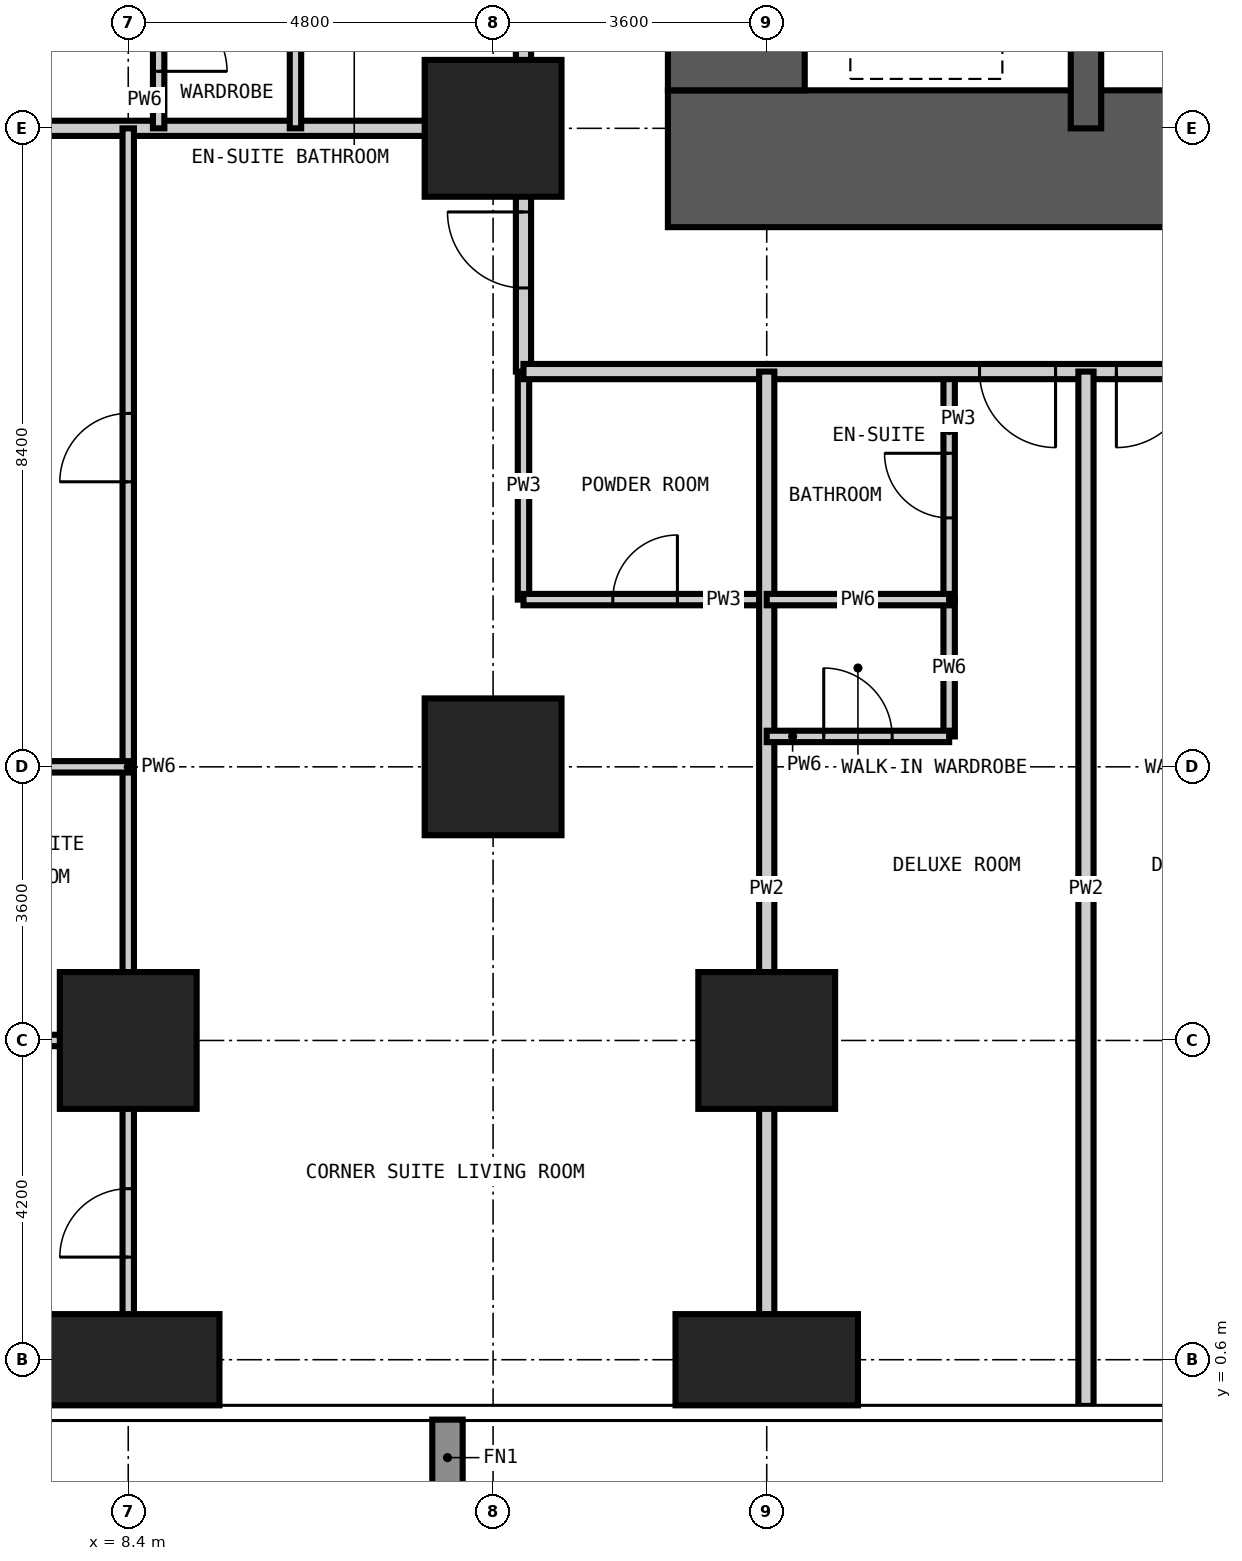
"""IFC4 building model, lengths in metres.
Left out: names, types, materials, properties, quantities, classifications, styles, units other than length and angle.
Written with IfcOpenShell. Run it as: python <this file> out.ifc"""

import sys

from ifc_helpers import new_model, si_unit, direction, frame, frame_2d, origin, origin_2d, place, context, subcontext, project, spatial, rectangle, extrude, element, fill, save


model = new_model("IFC4")
c1 = context("Model", 3, precision=1e-05, world=origin(), true_north=direction((0.0, 1.0)))
c2 = subcontext(c1, "Body", "Model", "MODEL_VIEW")
j1 = project(units=[si_unit("LENGTHUNIT", "METRE"), si_unit("PLANEANGLEUNIT", "RADIAN")], contexts=[c1])
p1 = place(None, origin())
s1 = spatial("IfcSite", under=j1, at=p1, CompositionType="ELEMENT")
p2 = place(p1, origin())
s2 = spatial("IfcBuilding", under=s1, at=p2, CompositionType="ELEMENT")
p3 = place(p2, frame((0.0, 0.0, 30.6)))
s3 = spatial("IfcBuildingStorey", under=s2, at=p3, CompositionType="ELEMENT", Elevation=30.6)
p4 = place(p3, frame((8.4, 0.6, -0.35), z_axis=(0.0, 0.0, 1.0), x_axis=(1.0, 0.0, 0.0)))
e1 = element("IfcColumn", 1, at=p4, inside=s3, PredefinedType="COLUMN", context=c2, shape_type="SweptSolid", body=[
    extrude(rectangle(XDim=2.4, YDim=1.2, at=origin_2d()), origin(), (0.0, 0.0, 1.0), 3.6),
])
for number, where, z_axis, x_axis in (
    (2, (8.4, 4.8, -0.35), (0.0, 0.0, 1.0), (1.0, 0.0, 0.0)),
    (3, (13.2, 8.4, -0.35), (0.0, 0.0, 1.0), (1.0, 0.0, 0.0)),
    (4, (13.2, 16.8, -0.35), (0.0, 0.0, 1.0), (1.0, 0.0, 0.0)),
):
    element("IfcColumn", number, at=place(p3, frame(where, z_axis=z_axis, x_axis=x_axis)), inside=s3, PredefinedType="COLUMN", context=c2, shape_type="SweptSolid", body=[
        extrude(rectangle(XDim=1.8, YDim=1.8, at=origin_2d()), origin(), (0.0, 0.0, 1.0), 3.6),
    ])
p5 = place(p3, frame((16.8, 0.6, -0.35), z_axis=(0.0, 0.0, 1.0), x_axis=(1.0, 0.0, 0.0)))
e5 = element("IfcColumn", 5, at=p5, inside=s3, PredefinedType="COLUMN", context=c2, shape_type="SweptSolid", body=[
    extrude(rectangle(XDim=2.4, YDim=1.2, at=origin_2d()), origin(), (0.0, 0.0, 1.0), 3.6),
])
p6 = place(p3, frame((16.8, 4.8, -0.35), z_axis=(0.0, 0.0, 1.0), x_axis=(1.0, 0.0, 0.0)))
e6 = element("IfcColumn", 6, at=p6, inside=s3, PredefinedType="COLUMN", context=c2, shape_type="SweptSolid", body=[
    extrude(rectangle(XDim=1.8, YDim=1.8, at=origin_2d()), origin(), (0.0, 0.0, 1.0), 3.6),
])
p7 = place(p3, frame((15.5, 16.4, -0.35), z_axis=(0.0, 0.0, 1.0), x_axis=(1.0, 0.0, 0.0)))
e7 = element("IfcWall", 7, at=p7, inside=s3, PredefinedType="SHEAR", context=c2, shape_type="SweptSolid", body=[
    extrude(rectangle(XDim=27.8, YDim=1.8, at=frame_2d((13.9, 0.0))), origin(), (0.0, 0.0, 1.0), 3.6),
])
p8 = place(p7, frame((13.4, 0.0, 0.35)))
e8 = element("IfcOpeningElement", 8, at=p8, cuts=e7, PredefinedType="OPENING", context=c2, shape_type="SweptSolid", body=[
    extrude(rectangle(XDim=1.0, YDim=2.1, at=frame_2d((0.5, 1.05))), frame((0.0, 0.91, 0.0), z_axis=(0.0, -1.0, 0.0), x_axis=(1.0, 0.0, 0.0)), (0.0, 0.0, 1.0), 1.82),
])
p9 = place(p7, frame((19.7, 0.0, 0.35)))
e9 = element("IfcOpeningElement", 9, at=p9, cuts=e7, PredefinedType="OPENING", context=c2, shape_type="SweptSolid", body=[
    extrude(rectangle(XDim=1.0, YDim=2.1, at=frame_2d((0.5, 1.05))), frame((0.0, 0.91, 0.0), z_axis=(0.0, -1.0, 0.0), x_axis=(1.0, 0.0, 0.0)), (0.0, 0.0, 1.0), 1.82),
])
p10 = place(p3, frame((16.4, 41.5, -0.35), z_axis=(0.0, 0.0, 1.0), x_axis=(0.0, -1.0, 0.0)))
e10 = element("IfcWall", 10, at=p10, inside=s3, PredefinedType="SHEAR", context=c2, shape_type="SweptSolid", body=[
    extrude(rectangle(XDim=24.2, YDim=1.8, at=frame_2d((12.1, 0.0))), origin(), (0.0, 0.0, 1.0), 3.6),
])
p11 = place(p10, frame((11.2, 0.0, 0.35)))
e11 = element("IfcOpeningElement", 11, at=p11, cuts=e10, PredefinedType="OPENING", context=c2, shape_type="SweptSolid", body=[
    extrude(rectangle(XDim=1.8, YDim=2.2, at=frame_2d((0.9, 1.1))), frame((0.0, 0.91, 0.0), z_axis=(0.0, -1.0, 0.0), x_axis=(1.0, 0.0, 0.0)), (0.0, 0.0, 1.0), 1.82),
])
p12 = place(p10, frame((20.0, 0.0, 0.35)))
e12 = element("IfcOpeningElement", 12, at=p12, cuts=e10, PredefinedType="OPENING", context=c2, shape_type="SweptSolid", body=[
    extrude(rectangle(XDim=1.0, YDim=2.1, at=frame_2d((0.5, 1.05))), frame((0.0, 0.91, 0.0), z_axis=(0.0, -1.0, 0.0), x_axis=(1.0, 0.0, 0.0)), (0.0, 0.0, 1.0), 1.82),
])
p13 = place(p10, frame((5.3, 0.0, 0.35)))
e13 = element("IfcOpeningElement", 13, at=p13, cuts=e10, PredefinedType="OPENING", context=c2, shape_type="SweptSolid", body=[
    extrude(rectangle(XDim=1.0, YDim=2.1, at=frame_2d((0.5, 1.05))), frame((0.0, 0.91, 0.0), z_axis=(0.0, -1.0, 0.0), x_axis=(1.0, 0.0, 0.0)), (0.0, 0.0, 1.0), 1.82),
])
p14 = place(p3, frame((21.0, 16.8, -0.35), z_axis=(0.0, 0.0, 1.0), x_axis=(0.0, 1.0, 0.0)))
e14 = element("IfcWall", 14, at=p14, inside=s3, PredefinedType="SHEAR", context=c2, shape_type="SweptSolid", body=[
    extrude(rectangle(XDim=2.8, YDim=0.4, at=frame_2d((1.4, 0.0))), origin(), (0.0, 0.0, 1.0), 3.6),
])
p15 = place(p3, frame((13.6, 10.6, 0.0), z_axis=(0.0, 0.0, 1.0), x_axis=(0.0, 1.0, 0.0)))
e15 = element("IfcWall", 15, at=p15, inside=s3, PredefinedType="PARTITIONING", context=c2, shape_type="SweptSolid", body=[
    extrude(rectangle(XDim=3.0, YDim=0.15, at=frame_2d((1.5, 0.0))), origin(), (0.0, 0.0, 1.0), 3.25),
])
p16 = place(p3, frame((19.2, 10.6, 0.0), z_axis=(0.0, 0.0, 1.0), x_axis=(0.0, 1.0, 0.0)))
e16 = element("IfcWall", 16, at=p16, inside=s3, PredefinedType="PARTITIONING", context=c2, shape_type="SweptSolid", body=[
    extrude(rectangle(XDim=3.0, YDim=0.15, at=frame_2d((1.5, 0.0))), origin(), (0.0, 0.0, 1.0), 3.25),
])
p17 = place(p16, frame((1.075, 0.0, 0.0)))
e17 = element("IfcOpeningElement", 17, at=p17, cuts=e16, PredefinedType="OPENING", context=c2, shape_type="SweptSolid", body=[
    extrude(rectangle(XDim=0.85, YDim=2.1, at=frame_2d((0.425, 1.05))), frame((0.0, 0.085, 0.0), z_axis=(0.0, -1.0, 0.0), x_axis=(1.0, 0.0, 0.0)), (0.0, 0.0, 1.0), 0.17),
])
p18 = place(p3, frame((5.4, 4.8, 0.0), z_axis=(0.0, 0.0, 1.0), x_axis=(1.0, 0.0, 0.0)))
e18 = element("IfcWall", 18, at=p18, inside=s3, PredefinedType="PARTITIONING", context=c2, shape_type="SweptSolid", body=[
    extrude(rectangle(XDim=3.0, YDim=0.15, at=frame_2d((1.5, 0.0))), origin(), (0.0, 0.0, 1.0), 3.25),
])
p19 = place(p3, frame((13.6, 10.6, 0.0), z_axis=(0.0, 0.0, 1.0), x_axis=(1.0, 0.0, 0.0)))
e19 = element("IfcWall", 19, at=p19, inside=s3, PredefinedType="PARTITIONING", context=c2, shape_type="SweptSolid", body=[
    extrude(rectangle(XDim=3.2, YDim=0.15, at=frame_2d((1.6, 0.0))), origin(), (0.0, 0.0, 1.0), 3.25),
])
p20 = place(p19, frame((1.175, 0.0, 0.0)))
e20 = element("IfcOpeningElement", 20, at=p20, cuts=e19, PredefinedType="OPENING", context=c2, shape_type="SweptSolid", body=[
    extrude(rectangle(XDim=0.85, YDim=2.1, at=frame_2d((0.425, 1.05))), frame((0.0, 0.085, 0.0), z_axis=(0.0, -1.0, 0.0), x_axis=(1.0, 0.0, 0.0)), (0.0, 0.0, 1.0), 0.17),
])
p21 = place(p3, frame((13.6, 13.6, 0.0), z_axis=(0.0, 0.0, 1.0), x_axis=(0.0, 1.0, 0.0)))
e21 = element("IfcWall", 21, at=p21, inside=s3, PredefinedType="PARTITIONING", context=c2, shape_type="SweptSolid", body=[
    extrude(rectangle(XDim=20.0, YDim=0.2, at=frame_2d((10.0, 0.0))), origin(), (0.0, 0.0, 1.0), 3.25),
])
p22 = place(p21, frame((6.0, 0.0, 0.0)))
e22 = element("IfcOpeningElement", 22, at=p22, cuts=e21, PredefinedType="OPENING", context=c2, shape_type="SweptSolid", body=[
    extrude(rectangle(XDim=1.0, YDim=2.2, at=frame_2d((0.5, 1.1))), frame((0.0, 0.11, 0.0), z_axis=(0.0, -1.0, 0.0), x_axis=(1.0, 0.0, 0.0)), (0.0, 0.0, 1.0), 0.22),
])
p23 = place(p21, frame((7.8, 0.0, 0.0)))
e23 = element("IfcOpeningElement", 23, at=p23, cuts=e21, PredefinedType="OPENING", context=c2, shape_type="SweptSolid", body=[
    extrude(rectangle(XDim=1.0, YDim=2.2, at=frame_2d((0.5, 1.1))), frame((0.0, 0.11, 0.0), z_axis=(0.0, -1.0, 0.0), x_axis=(1.0, 0.0, 0.0)), (0.0, 0.0, 1.0), 0.22),
])
p24 = place(p21, frame((14.4, 0.0, 0.0)))
e24 = element("IfcOpeningElement", 24, at=p24, cuts=e21, PredefinedType="OPENING", context=c2, shape_type="SweptSolid", body=[
    extrude(rectangle(XDim=1.0, YDim=2.2, at=frame_2d((0.5, 1.1))), frame((0.0, 0.11, 0.0), z_axis=(0.0, -1.0, 0.0), x_axis=(1.0, 0.0, 0.0)), (0.0, 0.0, 1.0), 0.22),
])
p25 = place(p21, frame((16.2, 0.0, 0.0)))
e25 = element("IfcOpeningElement", 25, at=p25, cuts=e21, PredefinedType="OPENING", context=c2, shape_type="SweptSolid", body=[
    extrude(rectangle(XDim=1.0, YDim=2.2, at=frame_2d((0.5, 1.1))), frame((0.0, 0.11, 0.0), z_axis=(0.0, -1.0, 0.0), x_axis=(1.0, 0.0, 0.0)), (0.0, 0.0, 1.0), 0.22),
])
p26 = place(p21, frame((1.1, 0.0, 0.0)))
e26 = element("IfcOpeningElement", 26, at=p26, cuts=e21, PredefinedType="OPENING", context=c2, shape_type="SweptSolid", body=[
    extrude(rectangle(XDim=1.0, YDim=2.2, at=frame_2d((0.5, 1.1))), frame((0.0, 0.11, 0.0), z_axis=(0.0, -1.0, 0.0), x_axis=(1.0, 0.0, 0.0)), (0.0, 0.0, 1.0), 0.22),
])
p27 = place(p3, frame((45.5, 13.6, 0.0), z_axis=(0.0, 0.0, 1.0), x_axis=(-1.0, 0.0, 0.0)))
e27 = element("IfcWall", 27, at=p27, inside=s3, PredefinedType="PARTITIONING", context=c2, shape_type="SweptSolid", body=[
    extrude(rectangle(XDim=31.9, YDim=0.2, at=frame_2d((15.95, 0.0))), origin(), (0.0, 0.0, 1.0), 3.25),
])
p28 = place(p27, frame((24.9, 0.0, 0.0)))
e28 = element("IfcOpeningElement", 28, at=p28, cuts=e27, PredefinedType="OPENING", context=c2, shape_type="SweptSolid", body=[
    extrude(rectangle(XDim=1.0, YDim=2.2, at=frame_2d((0.5, 1.1))), frame((0.0, 0.11, 0.0), z_axis=(0.0, -1.0, 0.0), x_axis=(1.0, 0.0, 0.0)), (0.0, 0.0, 1.0), 0.22),
])
p29 = place(p27, frame((23.1, 0.0, 0.0)))
e29 = element("IfcOpeningElement", 29, at=p29, cuts=e27, PredefinedType="OPENING", context=c2, shape_type="SweptSolid", body=[
    extrude(rectangle(XDim=1.0, YDim=2.2, at=frame_2d((0.5, 1.1))), frame((0.0, 0.11, 0.0), z_axis=(0.0, -1.0, 0.0), x_axis=(1.0, 0.0, 0.0)), (0.0, 0.0, 1.0), 0.22),
])
p30 = place(p27, frame((16.5, 0.0, 0.0)))
e30 = element("IfcOpeningElement", 30, at=p30, cuts=e27, PredefinedType="OPENING", context=c2, shape_type="SweptSolid", body=[
    extrude(rectangle(XDim=1.0, YDim=2.2, at=frame_2d((0.5, 1.1))), frame((0.0, 0.11, 0.0), z_axis=(0.0, -1.0, 0.0), x_axis=(1.0, 0.0, 0.0)), (0.0, 0.0, 1.0), 0.22),
])
p31 = place(p27, frame((14.7, 0.0, 0.0)))
e31 = element("IfcOpeningElement", 31, at=p31, cuts=e27, PredefinedType="OPENING", context=c2, shape_type="SweptSolid", body=[
    extrude(rectangle(XDim=1.0, YDim=2.2, at=frame_2d((0.5, 1.1))), frame((0.0, 0.11, 0.0), z_axis=(0.0, -1.0, 0.0), x_axis=(1.0, 0.0, 0.0)), (0.0, 0.0, 1.0), 0.22),
])
p32 = place(p27, frame((8.1, 0.0, 0.0)))
e32 = element("IfcOpeningElement", 32, at=p32, cuts=e27, PredefinedType="OPENING", context=c2, shape_type="SweptSolid", body=[
    extrude(rectangle(XDim=1.0, YDim=2.2, at=frame_2d((0.5, 1.1))), frame((0.0, 0.11, 0.0), z_axis=(0.0, -1.0, 0.0), x_axis=(1.0, 0.0, 0.0)), (0.0, 0.0, 1.0), 0.22),
])
p33 = place(p27, frame((6.3, 0.0, 0.0)))
e33 = element("IfcOpeningElement", 33, at=p33, cuts=e27, PredefinedType="OPENING", context=c2, shape_type="SweptSolid", body=[
    extrude(rectangle(XDim=1.0, YDim=2.2, at=frame_2d((0.5, 1.1))), frame((0.0, 0.11, 0.0), z_axis=(0.0, -1.0, 0.0), x_axis=(1.0, 0.0, 0.0)), (0.0, 0.0, 1.0), 0.22),
])
for number, where, z_axis, x_axis in (
    (34, (16.8, -0.008, 0.0), (0.0, 0.0, 1.0), (0.0, 1.0, 0.0)),
    (35, (21.0, -0.008, 0.0), (0.0, 0.0, 1.0), (0.0, 1.0, 0.0)),
    (36, (-0.008, 16.8, 0.0), (0.0, 0.0, 1.0), (1.0, 0.0, 0.0)),
):
    element("IfcWall", number, at=place(p3, frame(where, z_axis=z_axis, x_axis=x_axis)), inside=s3, PredefinedType="PARTITIONING", context=c2, shape_type="SweptSolid", body=[
        extrude(rectangle(XDim=13.608, YDim=0.2, at=frame_2d((6.804, 0.0))), origin(), (0.0, 0.0, 1.0), 3.25),
    ])
p34 = place(p3, frame((8.4, -0.008, 0.0), z_axis=(0.0, 0.0, 1.0), x_axis=(0.0, 1.0, 0.0)))
e37 = element("IfcWall", 37, at=p34, inside=s3, PredefinedType="PARTITIONING", context=c2, shape_type="SweptSolid", body=[
    extrude(rectangle(XDim=16.808, YDim=0.15, at=frame_2d((8.404, 0.0))), origin(), (0.0, 0.0, 1.0), 3.25),
])
p35 = place(p34, frame((1.958, 0.0, 0.0)))
e38 = element("IfcOpeningElement", 38, at=p35, cuts=e37, PredefinedType="OPENING", context=c2, shape_type="SweptSolid", body=[
    extrude(rectangle(XDim=0.9, YDim=2.1, at=frame_2d((0.45, 1.05))), frame((0.0, 0.085, 0.0), z_axis=(0.0, -1.0, 0.0), x_axis=(1.0, 0.0, 0.0)), (0.0, 0.0, 1.0), 0.17),
])
p36 = place(p34, frame((12.158, 0.0, 0.0)))
e39 = element("IfcOpeningElement", 39, at=p36, cuts=e37, PredefinedType="OPENING", context=c2, shape_type="SweptSolid", body=[
    extrude(rectangle(XDim=0.9, YDim=2.1, at=frame_2d((0.45, 1.05))), frame((0.0, 0.085, 0.0), z_axis=(0.0, -1.0, 0.0), x_axis=(1.0, 0.0, 0.0)), (0.0, 0.0, 1.0), 0.17),
])
p37 = place(p3, frame((8.8, 16.8, 0.0), z_axis=(0.0, 0.0, 1.0), x_axis=(0.0, 1.0, 0.0)))
e40 = element("IfcWall", 40, at=p37, inside=s3, PredefinedType="PARTITIONING", context=c2, shape_type="SweptSolid", body=[
    extrude(rectangle(XDim=2.4, YDim=0.15, at=frame_2d((1.2, 0.0))), origin(), (0.0, 0.0, 1.0), 3.25),
])
p38 = place(p37, frame((0.75, 0.0, 0.0)))
e41 = element("IfcOpeningElement", 41, at=p38, cuts=e40, PredefinedType="OPENING", context=c2, shape_type="SweptSolid", body=[
    extrude(rectangle(XDim=0.9, YDim=2.1, at=frame_2d((0.45, 1.05))), frame((0.0, 0.085, 0.0), z_axis=(0.0, -1.0, 0.0), x_axis=(1.0, 0.0, 0.0)), (0.0, 0.0, 1.0), 0.17),
])
p39 = place(p3, frame((10.6, 16.8, 0.0), z_axis=(0.0, 0.0, 1.0), x_axis=(0.0, 1.0, 0.0)))
e42 = element("IfcWall", 42, at=p39, inside=s3, PredefinedType="PARTITIONING", context=c2, shape_type="SweptSolid", body=[
    extrude(rectangle(XDim=2.4, YDim=0.15, at=frame_2d((1.2, 0.0))), origin(), (0.0, 0.0, 1.0), 3.25),
])
p40 = place(p3, frame((19.2, 8.8, 0.0), z_axis=(0.0, 0.0, 1.0), x_axis=(0.0, 1.0, 0.0)))
e43 = element("IfcWall", 43, at=p40, inside=s3, PredefinedType="PARTITIONING", context=c2, shape_type="SweptSolid", body=[
    extrude(rectangle(XDim=1.8, YDim=0.15, at=frame_2d((0.9, 0.0))), origin(), (0.0, 0.0, 1.0), 3.25),
])
p41 = place(p3, frame((-0.008, 8.4, 0.0), z_axis=(0.0, 0.0, 1.0), x_axis=(1.0, 0.0, 0.0)))
e44 = element("IfcWall", 44, at=p41, inside=s3, PredefinedType="PARTITIONING", context=c2, shape_type="SweptSolid", body=[
    extrude(rectangle(XDim=8.408, YDim=0.15, at=frame_2d((4.204, 0.0))), origin(), (0.0, 0.0, 1.0), 3.25),
])
p42 = place(p41, frame((2.958, 0.0, 0.0)))
e45 = element("IfcOpeningElement", 45, at=p42, cuts=e44, PredefinedType="OPENING", context=c2, shape_type="SweptSolid", body=[
    extrude(rectangle(XDim=0.9, YDim=2.1, at=frame_2d((0.45, 1.05))), frame((0.0, 0.085, 0.0), z_axis=(0.0, -1.0, 0.0), x_axis=(1.0, 0.0, 0.0)), (0.0, 0.0, 1.0), 0.17),
])
p43 = place(p3, frame((16.8, 8.8, 0.0), z_axis=(0.0, 0.0, 1.0), x_axis=(1.0, 0.0, 0.0)))
e46 = element("IfcWall", 46, at=p43, inside=s3, PredefinedType="PARTITIONING", context=c2, shape_type="SweptSolid", body=[
    extrude(rectangle(XDim=2.4, YDim=0.15, at=frame_2d((1.2, 0.0))), origin(), (0.0, 0.0, 1.0), 3.25),
])
p44 = place(p43, frame((0.75, 0.0, 0.0)))
e47 = element("IfcOpeningElement", 47, at=p44, cuts=e46, PredefinedType="OPENING", context=c2, shape_type="SweptSolid", body=[
    extrude(rectangle(XDim=0.9, YDim=2.1, at=frame_2d((0.45, 1.05))), frame((0.0, 0.085, 0.0), z_axis=(0.0, -1.0, 0.0), x_axis=(1.0, 0.0, 0.0)), (0.0, 0.0, 1.0), 0.17),
])
p45 = place(p3, frame((16.8, 10.6, 0.0), z_axis=(0.0, 0.0, 1.0), x_axis=(1.0, 0.0, 0.0)))
e48 = element("IfcWall", 48, at=p45, inside=s3, PredefinedType="PARTITIONING", context=c2, shape_type="SweptSolid", body=[
    extrude(rectangle(XDim=2.4, YDim=0.15, at=frame_2d((1.2, 0.0))), origin(), (0.0, 0.0, 1.0), 3.25),
])
p46 = place(p28, origin())
e49 = element("IfcDoor", 49, at=p46, inside=s3, OperationType="SINGLE_SWING_LEFT", PredefinedType="DOOR", context=c2, shape_type="SweptSolid", body=[
    extrude(rectangle(XDim=1.0, YDim=2.2, at=frame_2d((0.5, 1.1))), frame((0.0, 0.025, 0.0), z_axis=(0.0, -1.0, 0.0), x_axis=(1.0, 0.0, 0.0)), (0.0, 0.0, 1.0), 0.05),
])
fill(e28, e49)
p47 = place(p17, origin())
e50 = element("IfcDoor", 50, at=p47, inside=s3, OperationType="SINGLE_SWING_RIGHT", PredefinedType="DOOR", context=c2, shape_type="SweptSolid", body=[
    extrude(rectangle(XDim=0.85, YDim=2.1, at=frame_2d((0.425, 1.05))), frame((0.0, 0.025, 0.0), z_axis=(0.0, -1.0, 0.0), x_axis=(1.0, 0.0, 0.0)), (0.0, 0.0, 1.0), 0.05),
])
fill(e17, e50)
p48 = place(p44, origin())
e51 = element("IfcDoor", 51, at=p48, inside=s3, OperationType="SINGLE_SWING_LEFT", PredefinedType="DOOR", context=c2, shape_type="SweptSolid", body=[
    extrude(rectangle(XDim=0.9, YDim=2.1, at=frame_2d((0.45, 1.05))), frame((0.0, 0.025, 0.0), z_axis=(0.0, -1.0, 0.0), x_axis=(1.0, 0.0, 0.0)), (0.0, 0.0, 1.0), 0.05),
])
fill(e47, e51)
p49 = place(p29, origin())
e52 = element("IfcDoor", 52, at=p49, inside=s3, OperationType="SINGLE_SWING_RIGHT", PredefinedType="DOOR", context=c2, shape_type="SweptSolid", body=[
    extrude(rectangle(XDim=1.0, YDim=2.2, at=frame_2d((0.5, 1.1))), frame((0.0, 0.025, 0.0), z_axis=(0.0, -1.0, 0.0), x_axis=(1.0, 0.0, 0.0)), (0.0, 0.0, 1.0), 0.05),
])
fill(e29, e52)
p50 = place(p38, frame((0.9, 0.0, 0.0), z_axis=(0.0, 0.0, 1.0), x_axis=(-1.0, 0.0, 0.0)))
e53 = element("IfcDoor", 53, at=p50, inside=s3, OperationType="SINGLE_SWING_RIGHT", PredefinedType="DOOR", context=c2, shape_type="SweptSolid", body=[
    extrude(rectangle(XDim=0.9, YDim=2.1, at=frame_2d((0.45, 1.05))), frame((0.0, 0.025, 0.0), z_axis=(0.0, -1.0, 0.0), x_axis=(1.0, 0.0, 0.0)), (0.0, 0.0, 1.0), 0.05),
])
fill(e41, e53)
p51 = place(p26, origin())
e54 = element("IfcDoor", 54, at=p51, inside=s3, OperationType="SINGLE_SWING_RIGHT", PredefinedType="DOOR", context=c2, shape_type="SweptSolid", body=[
    extrude(rectangle(XDim=1.0, YDim=2.2, at=frame_2d((0.5, 1.1))), frame((0.0, 0.025, 0.0), z_axis=(0.0, -1.0, 0.0), x_axis=(1.0, 0.0, 0.0)), (0.0, 0.0, 1.0), 0.05),
])
fill(e26, e54)
p52 = place(p20, origin())
e55 = element("IfcDoor", 55, at=p52, inside=s3, OperationType="SINGLE_SWING_RIGHT", PredefinedType="DOOR", context=c2, shape_type="SweptSolid", body=[
    extrude(rectangle(XDim=0.85, YDim=2.1, at=frame_2d((0.425, 1.05))), frame((0.0, 0.025, 0.0), z_axis=(0.0, -1.0, 0.0), x_axis=(1.0, 0.0, 0.0)), (0.0, 0.0, 1.0), 0.05),
])
fill(e20, e55)
p53 = place(p35, origin())
e56 = element("IfcDoor", 56, at=p53, inside=s3, OperationType="SINGLE_SWING_LEFT", PredefinedType="DOOR", context=c2, shape_type="SweptSolid", body=[
    extrude(rectangle(XDim=0.9, YDim=2.1, at=frame_2d((0.45, 1.05))), frame((0.0, 0.025, 0.0), z_axis=(0.0, -1.0, 0.0), x_axis=(1.0, 0.0, 0.0)), (0.0, 0.0, 1.0), 0.05),
])
fill(e38, e56)
p54 = place(p36, origin())
e57 = element("IfcDoor", 57, at=p54, inside=s3, OperationType="SINGLE_SWING_LEFT", PredefinedType="DOOR", context=c2, shape_type="SweptSolid", body=[
    extrude(rectangle(XDim=0.9, YDim=2.1, at=frame_2d((0.45, 1.05))), frame((0.0, 0.025, 0.0), z_axis=(0.0, -1.0, 0.0), x_axis=(1.0, 0.0, 0.0)), (0.0, 0.0, 1.0), 0.05),
])
fill(e39, e57)
save(model, sys.argv[1])
